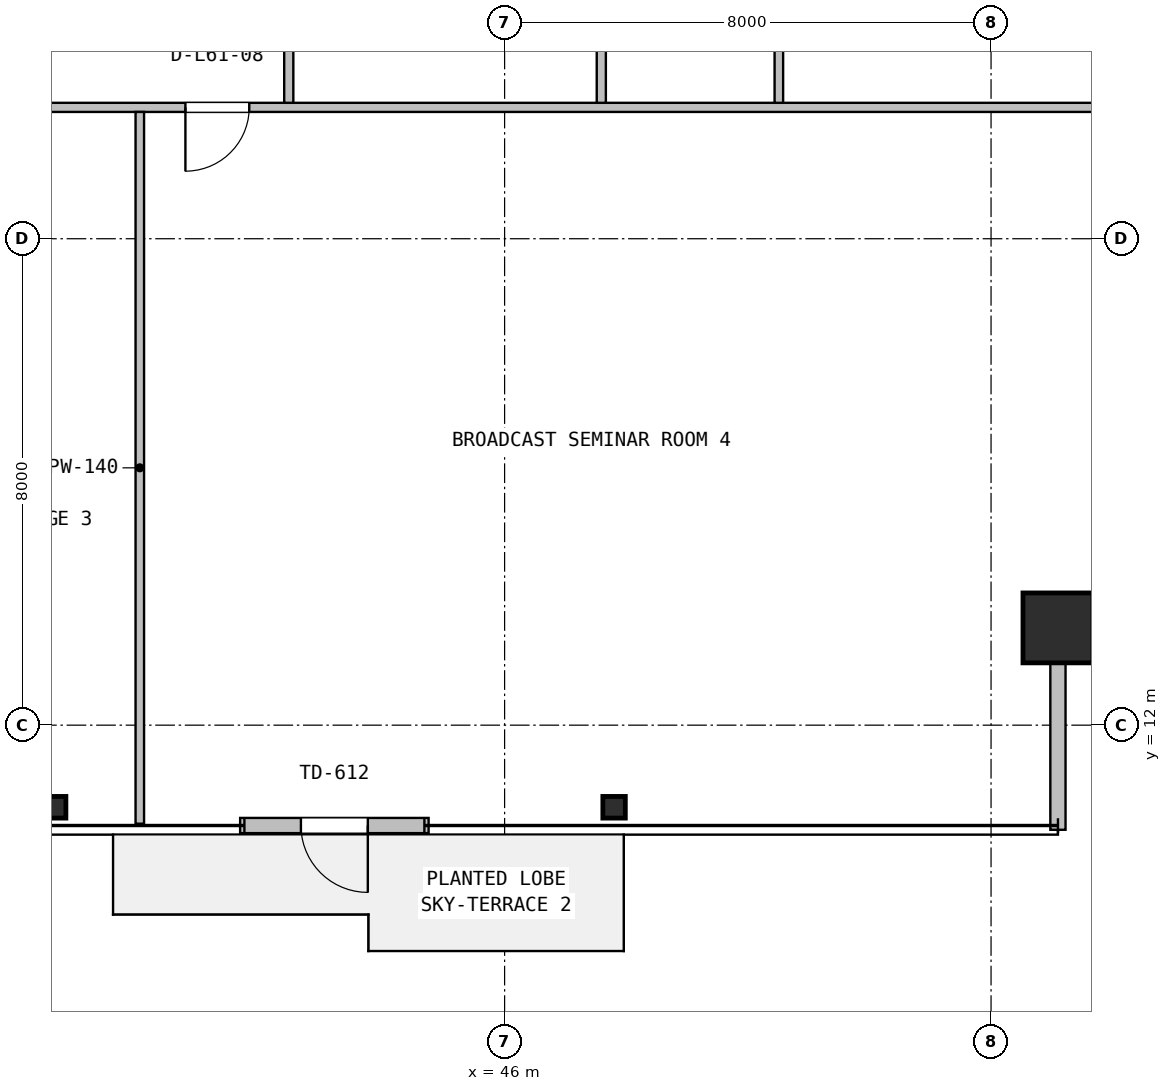
"""IFC4 building model, lengths in metres.
Left out: names, types, materials, properties, quantities, classifications, styles, units other than length and angle.
Written with IfcOpenShell. Run it as: python <this file> out.ifc"""

import sys

from ifc_helpers import new_model, si_unit, direction, frame, frame_2d, origin, origin_2d, place, context, subcontext, project, spatial, rectangle, hollow_rectangle, i_section, extrude, source, transform, mapped, element, fill, save


model = new_model("IFC4")
c1 = context("Model", 3, precision=1e-05, world=origin(), true_north=direction((0.0, 1.0)))
c2 = subcontext(c1, "Body", "Model", "MODEL_VIEW")
j1 = project(units=[si_unit("LENGTHUNIT", "METRE"), si_unit("PLANEANGLEUNIT", "RADIAN")], contexts=[c1])
p1 = place(None, origin())
s1 = spatial("IfcSite", under=j1, at=p1, CompositionType="ELEMENT")
p2 = place(p1, origin())
s2 = spatial("IfcBuilding", under=s1, at=p2, CompositionType="ELEMENT")
p3 = place(p2, frame((0.0, 0.0, 247.0)))
s3 = spatial("IfcBuildingStorey", under=s2, at=p3, CompositionType="ELEMENT", Elevation=247.0)
m1 = source(origin(), c2, "Body", "SweptSolid", [
    extrude(hollow_rectangle(XDim=1.15, YDim=1.15, WallThickness=0.045, at=origin_2d()), origin(), (0.0, 0.0, 1.0), 3.8),
])
p4 = place(p3, frame((55.1, 13.6, 0.0), z_axis=(0.0, 0.0, 1.0), x_axis=(1.0, 0.0, 0.0)))
e1 = element("IfcColumn", 1, at=p4, inside=s3, PredefinedType="COLUMN", context=c2, shape_type="MappedRepresentation", body=[
    mapped(m1, transform((0.0, 0.0, 0.0), x_axis=(1.0, 0.0, 0.0), y_axis=(0.0, 1.0, 0.0), z_axis=(0.0, 0.0, 1.0), scale=1.0)),
])
m2 = source(origin(), c2, "Body", "SweptSolid", [
    extrude(i_section(OverallWidth=0.369, OverallDepth=0.356, WebThickness=0.011, FlangeThickness=0.018, FilletRadius=0.016, at=origin_2d()), origin(), (0.0, 0.0, 1.0), 3.8),
])
for number, where, z_axis, x_axis in (
    (2, (38.6, 10.65, 0.0), (0.0, 0.0, 1.0), (1.0, 0.0, 0.0)),
    (3, (47.8, 10.65, 0.0), (0.0, 0.0, 1.0), (1.0, 0.0, 0.0)),
):
    element("IfcColumn", number, at=place(p3, frame(where, z_axis=z_axis, x_axis=x_axis)), inside=s3, PredefinedType="COLUMN", context=c2, shape_type="MappedRepresentation", body=[
        mapped(m2, transform((0.0, 0.0, 0.0), x_axis=(1.0, 0.0, 0.0), y_axis=(0.0, 1.0, 0.0), z_axis=(0.0, 0.0, 1.0), scale=1.0)),
    ])
p5 = place(p3, frame((41.65, 10.35, 0.0), z_axis=(0.0, 0.0, 1.0), x_axis=(1.0, 0.0, 0.0)))
e4 = element("IfcWall", 4, at=p5, inside=s3, PredefinedType="SOLIDWALL", context=c2, shape_type="SweptSolid", body=[
    extrude(rectangle(XDim=3.1, YDim=0.25, at=frame_2d((1.55, 0.0))), origin(), (0.0, 0.0, 1.0), 3.53),
])
p6 = place(p5, frame((1.0, 0.0, 0.0)))
e5 = element("IfcOpeningElement", 5, at=p6, cuts=e4, PredefinedType="OPENING", context=c2, shape_type="SweptSolid", body=[
    extrude(rectangle(XDim=1.1, YDim=2.15, at=frame_2d((0.55, 1.075))), frame((0.0, 0.135, 0.0), z_axis=(0.0, -1.0, 0.0), x_axis=(1.0, 0.0, 0.0)), (0.0, 0.0, 1.0), 0.27),
])
p7 = place(p3, frame((55.1, 10.28, 0.0), z_axis=(0.0, 0.0, 1.0), x_axis=(0.0, 1.0, 0.0)))
e6 = element("IfcWall", 6, at=p7, inside=s3, PredefinedType="SOLIDWALL", context=c2, shape_type="SweptSolid", body=[
    extrude(rectangle(XDim=3.4, YDim=0.25, at=frame_2d((1.7, 0.0))), origin(), (0.0, 0.0, 1.0), 3.171),
])
p8 = place(p3, frame((9.68, 22.16, 0.0), z_axis=(0.0, 0.0, 1.0), x_axis=(1.0, 0.0, 0.0)))
e7 = element("IfcWall", 7, at=p8, inside=s3, PredefinedType="PARTITIONING", context=c2, shape_type="SweptSolid", body=[
    extrude(rectangle(XDim=48.64, YDim=0.15, at=frame_2d((24.32, 0.0))), origin(), (0.0, 0.0, 1.0), 2.908),
])
p9 = place(p8, frame((17.105, 0.0, 0.0)))
e8 = element("IfcOpeningElement", 8, at=p9, cuts=e7, PredefinedType="OPENING", context=c2, shape_type="SweptSolid", body=[
    extrude(rectangle(XDim=0.88, YDim=2.06, at=frame_2d((0.44, 1.03))), frame((0.0, 0.085, 0.0), z_axis=(0.0, -1.0, 0.0), x_axis=(1.0, 0.0, 0.0)), (0.0, 0.0, 1.0), 0.17),
])
p10 = place(p8, frame((21.7, 0.0, 0.0)))
e9 = element("IfcOpeningElement", 9, at=p10, cuts=e7, PredefinedType="OPENING", context=c2, shape_type="SweptSolid", body=[
    extrude(rectangle(XDim=0.92, YDim=2.08, at=frame_2d((0.46, 1.04))), frame((0.0, 0.085, 0.0), z_axis=(0.0, -1.0, 0.0), x_axis=(1.0, 0.0, 0.0)), (0.0, 0.0, 1.0), 0.17),
])
p11 = place(p8, frame((27.51, 0.0, 0.0)))
e10 = element("IfcOpeningElement", 10, at=p11, cuts=e7, PredefinedType="OPENING", context=c2, shape_type="SweptSolid", body=[
    extrude(rectangle(XDim=1.0, YDim=2.1, at=frame_2d((0.5, 1.05))), frame((0.0, 0.085, 0.0), z_axis=(0.0, -1.0, 0.0), x_axis=(1.0, 0.0, 0.0)), (0.0, 0.0, 1.0), 0.17),
])
p12 = place(p8, frame((31.07, 0.0, 0.0)))
e11 = element("IfcOpeningElement", 11, at=p12, cuts=e7, PredefinedType="OPENING", context=c2, shape_type="SweptSolid", body=[
    extrude(rectangle(XDim=1.05, YDim=2.1, at=frame_2d((0.525, 1.05))), frame((0.0, 0.085, 0.0), z_axis=(0.0, -1.0, 0.0), x_axis=(1.0, 0.0, 0.0)), (0.0, 0.0, 1.0), 0.17),
])
p13 = place(p3, frame((40.0, 10.38, 0.0), z_axis=(0.0, 0.0, 1.0), x_axis=(0.0, 1.0, 0.0)))
e12 = element("IfcWall", 12, at=p13, inside=s3, PredefinedType="PARTITIONING", context=c2, shape_type="SweptSolid", body=[
    extrude(rectangle(XDim=11.705, YDim=0.14, at=frame_2d((5.853, 0.0))), origin(), (0.0, 0.0, 1.0), 3.171),
])
p14 = place(p3, frame((47.59, 22.235, 0.0), z_axis=(0.0, 0.0, 1.0), x_axis=(0.0, 1.0, 0.0)))
e13 = element("IfcWall", 13, at=p14, inside=s3, PredefinedType="PARTITIONING", context=c2, shape_type="SweptSolid", body=[
    extrude(rectangle(XDim=11.04, YDim=0.15, at=frame_2d((5.52, 0.0))), origin(), (0.0, 0.0, 1.0), 3.222),
])
p15 = place(p3, frame((42.45, 22.235, 0.0), z_axis=(0.0, 0.0, 1.0), x_axis=(0.0, 1.0, 0.0)))
e14 = element("IfcWall", 14, at=p15, inside=s3, PredefinedType="PARTITIONING", context=c2, shape_type="SweptSolid", body=[
    extrude(rectangle(XDim=11.04, YDim=0.15, at=frame_2d((5.52, 0.0))), origin(), (0.0, 0.0, 1.0), 2.908),
])
p16 = place(p15, frame((5.06, 0.0, 0.0)))
e15 = element("IfcOpeningElement", 15, at=p16, cuts=e14, PredefinedType="OPENING", context=c2, shape_type="SweptSolid", body=[
    extrude(rectangle(XDim=0.92, YDim=2.08, at=frame_2d((0.46, 1.04))), frame((0.0, 0.085, 0.0), z_axis=(0.0, -1.0, 0.0), x_axis=(1.0, 0.0, 0.0)), (0.0, 0.0, 1.0), 0.17),
])
p17 = place(p3, frame((50.51, 22.235, 0.0), z_axis=(0.0, 0.0, 1.0), x_axis=(0.0, 1.0, 0.0)))
e16 = element("IfcWall", 16, at=p17, inside=s3, PredefinedType="PARTITIONING", context=c2, shape_type="SweptSolid", body=[
    extrude(rectangle(XDim=11.04, YDim=0.14, at=frame_2d((5.52, 0.0))), origin(), (0.0, 0.0, 1.0), 3.222),
])
m3 = source(origin(), c2, "Body", "SweptSolid", [
    extrude(rectangle(XDim=1.1, YDim=2.15, at=frame_2d((0.55, 1.075))), frame((0.0, 0.025, 0.0), z_axis=(0.0, -1.0, 0.0), x_axis=(1.0, 0.0, 0.0)), (0.0, 0.0, 1.0), 0.05),
])
p18 = place(p6, frame((1.1, 0.0, 0.0), z_axis=(0.0, 0.0, 1.0), x_axis=(-1.0, 0.0, 0.0)))
e17 = element("IfcDoor", 17, at=p18, inside=s3, OperationType="SINGLE_SWING_RIGHT", PredefinedType="DOOR", context=c2, shape_type="MappedRepresentation", body=[
    mapped(m3, transform((0.0, 0.0, 0.0), x_axis=(1.0, 0.0, 0.0), y_axis=(0.0, 1.0, 0.0), z_axis=(0.0, 0.0, 1.0), scale=1.0)),
])
fill(e5, e17)
m4 = source(origin(), c2, "Body", "SweptSolid", [
    extrude(rectangle(XDim=1.05, YDim=2.1, at=frame_2d((0.525, 1.05))), frame((0.0, 0.025, 0.0), z_axis=(0.0, -1.0, 0.0), x_axis=(1.0, 0.0, 0.0)), (0.0, 0.0, 1.0), 0.05),
])
p19 = place(p12, frame((1.05, 0.0, 0.0), z_axis=(0.0, 0.0, 1.0), x_axis=(-1.0, 0.0, 0.0)))
e18 = element("IfcDoor", 18, at=p19, inside=s3, OperationType="SINGLE_SWING_LEFT", PredefinedType="DOOR", context=c2, shape_type="MappedRepresentation", body=[
    mapped(m4, transform((0.0, 0.0, 0.0), x_axis=(1.0, 0.0, 0.0), y_axis=(0.0, 1.0, 0.0), z_axis=(0.0, 0.0, 1.0), scale=1.0)),
])
fill(e11, e18)
save(model, sys.argv[1])
